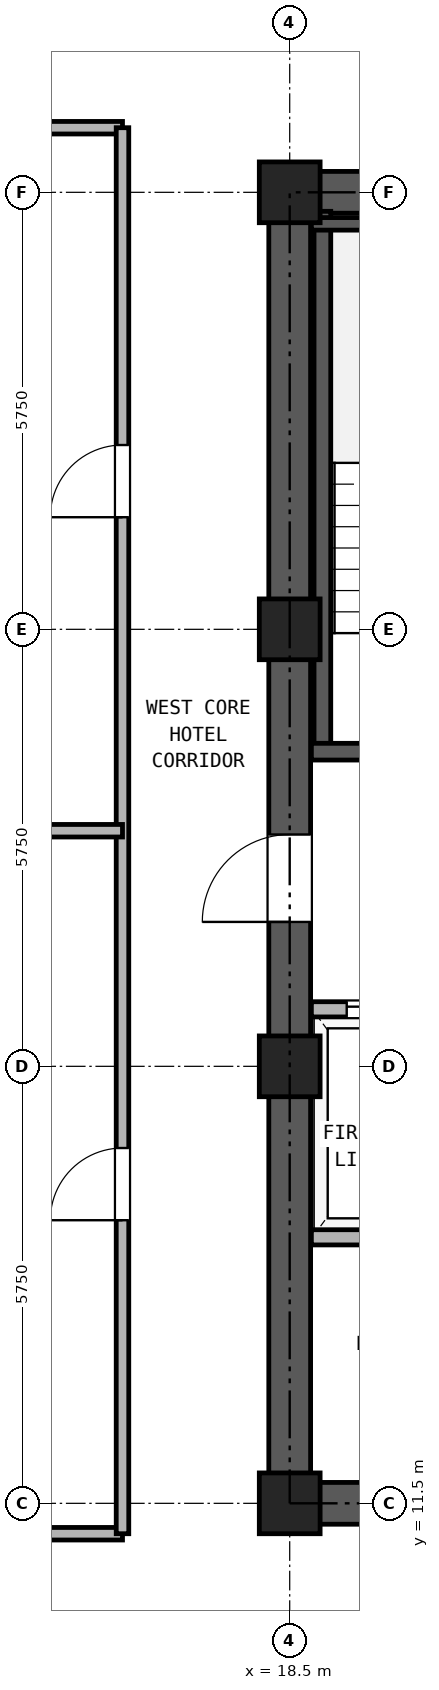
"""IFC4 building model, lengths in metres.
Left out: names, types, materials, properties, quantities, classifications, styles, units other than length and angle.
Written with IfcOpenShell. Run it as: python <this file> out.ifc"""

import sys

from ifc_helpers import new_model, si_unit, direction, frame, frame_2d, origin, origin_2d, place, context, subcontext, project, spatial, rectangle, hollow_rectangle, extrude, source, transform, mapped, element, fill, save


model = new_model("IFC4")
c1 = context("Model", 3, precision=1e-05, world=origin(), true_north=direction((0.0, 1.0)))
c2 = subcontext(c1, "Body", "Model", "MODEL_VIEW")
j1 = project(units=[si_unit("LENGTHUNIT", "METRE"), si_unit("PLANEANGLEUNIT", "RADIAN")], contexts=[c1])
p1 = place(None, origin())
s1 = spatial("IfcSite", under=j1, at=p1, CompositionType="ELEMENT")
p2 = place(p1, origin())
s2 = spatial("IfcBuilding", under=s1, at=p2, CompositionType="ELEMENT")
p3 = place(p2, frame((0.0, 0.0, 148.4)))
s3 = spatial("IfcBuildingStorey", under=s2, at=p3, CompositionType="ELEMENT", Elevation=148.4)
m1 = source(origin(), c2, "Body", "SweptSolid", [
    extrude(hollow_rectangle(XDim=0.8, YDim=0.8, WallThickness=0.045, at=origin_2d()), origin(), (0.0, 0.0, 1.0), 2.84),
])
for number, where, z_axis, x_axis in (
    (1, (18.5, 11.5, 0.0), (0.0, 0.0, 1.0), (1.0, 0.0, 0.0)),
    (2, (18.5, 17.25, 0.0), (0.0, 0.0, 1.0), (1.0, 0.0, 0.0)),
    (3, (18.5, 23.0, 0.0), (0.0, 0.0, 1.0), (1.0, 0.0, 0.0)),
    (4, (18.5, 28.75, 0.0), (0.0, 0.0, 1.0), (1.0, 0.0, 0.0)),
):
    element("IfcColumn", number, at=place(p3, frame(where, z_axis=z_axis, x_axis=x_axis)), inside=s3, PredefinedType="COLUMN", context=c2, shape_type="MappedRepresentation", body=[
        mapped(m1, transform((0.0, 0.0, 0.0), x_axis=(1.0, 0.0, 0.0), y_axis=(0.0, 1.0, 0.0), z_axis=(0.0, 0.0, 1.0), scale=1.0)),
    ])
p4 = place(p3, frame((18.225, 11.5, 0.0), z_axis=(0.0, 0.0, 1.0), x_axis=(1.0, 0.0, 0.0)))
e5 = element("IfcWall", 5, at=p4, inside=s3, PredefinedType="SHEAR", context=c2, shape_type="SweptSolid", body=[
    extrude(rectangle(XDim=10.55, YDim=0.55, at=frame_2d((5.275, 0.0))), origin(), (0.0, 0.0, 1.0), 2.84),
])
p5 = place(p4, frame((2.375, 0.0, 0.0)))
e6 = element("IfcOpeningElement", 6, at=p5, cuts=e5, PredefinedType="OPENING", context=c2, shape_type="SweptSolid", body=[
    extrude(rectangle(XDim=0.95, YDim=2.15, at=frame_2d((0.475, 1.075))), frame((0.0, 0.285, 0.0), z_axis=(0.0, -1.0, 0.0), x_axis=(1.0, 0.0, 0.0)), (0.0, 0.0, 1.0), 0.57),
])
p6 = place(p4, frame((5.875, 0.0, 0.0)))
e7 = element("IfcOpeningElement", 7, at=p6, cuts=e5, PredefinedType="OPENING", context=c2, shape_type="SweptSolid", body=[
    extrude(rectangle(XDim=1.1, YDim=2.25, at=frame_2d((0.55, 1.125))), frame((0.0, 0.285, 0.0), z_axis=(0.0, -1.0, 0.0), x_axis=(1.0, 0.0, 0.0)), (0.0, 0.0, 1.0), 0.57),
])
p7 = place(p4, frame((8.275, 0.0, 0.0)))
e8 = element("IfcOpeningElement", 8, at=p7, cuts=e5, PredefinedType="OPENING", context=c2, shape_type="SweptSolid", body=[
    extrude(rectangle(XDim=1.1, YDim=2.25, at=frame_2d((0.55, 1.125))), frame((0.0, 0.285, 0.0), z_axis=(0.0, -1.0, 0.0), x_axis=(1.0, 0.0, 0.0)), (0.0, 0.0, 1.0), 0.57),
])
p8 = place(p3, frame((18.225, 28.75, 0.0), z_axis=(0.0, 0.0, 1.0), x_axis=(1.0, 0.0, 0.0)))
e9 = element("IfcWall", 9, at=p8, inside=s3, PredefinedType="SHEAR", context=c2, shape_type="SweptSolid", body=[
    extrude(rectangle(XDim=10.55, YDim=0.55, at=frame_2d((5.275, 0.0))), origin(), (0.0, 0.0, 1.0), 2.84),
])
p9 = place(p8, frame((4.155, 0.0, 0.0)))
e10 = element("IfcOpeningElement", 10, at=p9, cuts=e9, PredefinedType="OPENING", context=c2, shape_type="SweptSolid", body=[
    extrude(rectangle(XDim=0.9, YDim=2.05, at=frame_2d((0.45, 1.025))), frame((0.0, 0.285, 0.0), z_axis=(0.0, -1.0, 0.0), x_axis=(1.0, 0.0, 0.0)), (0.0, 0.0, 1.0), 0.57),
])
p10 = place(p8, frame((5.695, 0.0, 0.0)))
e11 = element("IfcOpeningElement", 11, at=p10, cuts=e9, PredefinedType="OPENING", context=c2, shape_type="SweptSolid", body=[
    extrude(rectangle(XDim=0.9, YDim=2.05, at=frame_2d((0.45, 1.025))), frame((0.0, 0.285, 0.0), z_axis=(0.0, -1.0, 0.0), x_axis=(1.0, 0.0, 0.0)), (0.0, 0.0, 1.0), 0.57),
])
p11 = place(p3, frame((18.5, 11.775, 0.0), z_axis=(0.0, 0.0, 1.0), x_axis=(0.0, 1.0, 0.0)))
e12 = element("IfcWall", 12, at=p11, inside=s3, PredefinedType="SHEAR", context=c2, shape_type="SweptSolid", body=[
    extrude(rectangle(XDim=16.7, YDim=0.55, at=frame_2d((8.35, 0.0))), origin(), (0.0, 0.0, 1.0), 2.84),
])
p12 = place(p11, frame((7.375, 0.0, 0.0)))
e13 = element("IfcOpeningElement", 13, at=p12, cuts=e12, PredefinedType="OPENING", context=c2, shape_type="SweptSolid", body=[
    extrude(rectangle(XDim=1.15, YDim=2.2, at=frame_2d((0.575, 1.1))), frame((0.0, 0.285, 0.0), z_axis=(0.0, -1.0, 0.0), x_axis=(1.0, 0.0, 0.0)), (0.0, 0.0, 1.0), 0.57),
])
p13 = place(p3, frame((18.93, 21.39, 0.0), z_axis=(0.0, 0.0, 1.0), x_axis=(0.0, 1.0, 0.0)))
e14 = element("IfcWall", 14, at=p13, inside=s3, PredefinedType="SOLIDWALL", context=c2, shape_type="SweptSolid", body=[
    extrude(rectangle(XDim=7.11, YDim=0.22, at=frame_2d((3.555, 0.0))), origin(), (0.0, 0.0, 1.0), 2.84),
])
p14 = place(p3, frame((18.785, 28.335, 0.0), z_axis=(0.0, 0.0, 1.0), x_axis=(1.0, 0.0, 0.0)))
e15 = element("IfcWall", 15, at=p14, inside=s3, PredefinedType="PARTITIONING", context=c2, shape_type="SweptSolid", body=[
    extrude(rectangle(XDim=3.325, YDim=0.165, at=frame_2d((1.663, 0.0))), origin(), (0.0, 0.0, 1.0), 2.84),
])
p15 = place(p3, frame((18.785, 21.39, 0.0), z_axis=(0.0, 0.0, 1.0), x_axis=(1.0, 0.0, 0.0)))
e16 = element("IfcWall", 16, at=p15, inside=s3, PredefinedType="SOLIDWALL", context=c2, shape_type="SweptSolid", body=[
    extrude(rectangle(XDim=6.345, YDim=0.22, at=frame_2d((3.172, 0.0))), origin(), (0.0, 0.0, 1.0), 2.84),
])
p16 = place(p15, frame((1.065, 0.0, 0.0)))
e17 = element("IfcOpeningElement", 17, at=p16, cuts=e16, PredefinedType="OPENING", context=c2, shape_type="SweptSolid", body=[
    extrude(rectangle(XDim=1.15, YDim=2.2, at=frame_2d((0.575, 1.1))), frame((0.0, 0.12, 0.0), z_axis=(0.0, -1.0, 0.0), x_axis=(1.0, 0.0, 0.0)), (0.0, 0.0, 1.0), 0.24),
])
p17 = place(p15, frame((4.795, 0.0, 0.0)))
e18 = element("IfcOpeningElement", 18, at=p17, cuts=e16, PredefinedType="OPENING", context=c2, shape_type="SweptSolid", body=[
    extrude(rectangle(XDim=1.1, YDim=2.25, at=frame_2d((0.55, 1.125))), frame((0.0, 0.12, 0.0), z_axis=(0.0, -1.0, 0.0), x_axis=(1.0, 0.0, 0.0)), (0.0, 0.0, 1.0), 0.24),
])
p18 = place(p3, frame((18.785, 18.0, 0.0), z_axis=(0.0, 0.0, 1.0), x_axis=(1.0, 0.0, 0.0)))
e19 = element("IfcWall", 19, at=p18, inside=s3, PredefinedType="PARTITIONING", context=c2, shape_type="SweptSolid", body=[
    extrude(rectangle(XDim=9.43, YDim=0.2, at=frame_2d((4.715, 0.0))), origin(), (0.0, 0.0, 1.0), 2.84),
])
p19 = place(p18, frame((0.465, 0.0, 0.0)))
e20 = element("IfcOpeningElement", 20, at=p19, cuts=e19, PredefinedType="OPENING", context=c2, shape_type="SweptSolid", body=[
    extrude(rectangle(XDim=1.3, YDim=2.3, at=frame_2d((0.65, 1.15))), frame((0.0, 0.11, 0.0), z_axis=(0.0, -1.0, 0.0), x_axis=(1.0, 0.0, 0.0)), (0.0, 0.0, 1.0), 0.22),
])
p20 = place(p18, frame((2.565, 0.0, 0.0)))
e21 = element("IfcOpeningElement", 21, at=p20, cuts=e19, PredefinedType="OPENING", context=c2, shape_type="SweptSolid", body=[
    extrude(rectangle(XDim=1.3, YDim=2.3, at=frame_2d((0.65, 1.15))), frame((0.0, 0.11, 0.0), z_axis=(0.0, -1.0, 0.0), x_axis=(1.0, 0.0, 0.0)), (0.0, 0.0, 1.0), 0.22),
])
p21 = place(p18, frame((4.965, 0.0, 0.0)))
e22 = element("IfcOpeningElement", 22, at=p21, cuts=e19, PredefinedType="OPENING", context=c2, shape_type="SweptSolid", body=[
    extrude(rectangle(XDim=0.9, YDim=2.05, at=frame_2d((0.45, 1.025))), frame((0.0, 0.11, 0.0), z_axis=(0.0, -1.0, 0.0), x_axis=(1.0, 0.0, 0.0)), (0.0, 0.0, 1.0), 0.22),
])
p22 = place(p18, frame((7.665, 0.0, 0.0)))
e23 = element("IfcOpeningElement", 23, at=p22, cuts=e19, PredefinedType="OPENING", context=c2, shape_type="SweptSolid", body=[
    extrude(rectangle(XDim=0.9, YDim=2.05, at=frame_2d((0.45, 1.025))), frame((0.0, 0.11, 0.0), z_axis=(0.0, -1.0, 0.0), x_axis=(1.0, 0.0, 0.0)), (0.0, 0.0, 1.0), 0.22),
])
p23 = place(p3, frame((18.785, 15.0, 0.0), z_axis=(0.0, 0.0, 1.0), x_axis=(1.0, 0.0, 0.0)))
e24 = element("IfcWall", 24, at=p23, inside=s3, PredefinedType="PARTITIONING", context=c2, shape_type="SweptSolid", body=[
    extrude(rectangle(XDim=9.43, YDim=0.2, at=frame_2d((4.715, 0.0))), origin(), (0.0, 0.0, 1.0), 2.84),
])
for number, where, z_axis, x_axis in (
    (25, (7.8, 11.1, 0.0), (0.0, 0.0, 1.0), (1.0, 0.0, 0.0)),
    (26, (7.8, 29.6, 0.0), (0.0, 0.0, 1.0), (1.0, 0.0, 0.0)),
):
    element("IfcWall", number, at=place(p3, frame(where, z_axis=z_axis, x_axis=x_axis)), inside=s3, PredefinedType="PARTITIONING", context=c2, shape_type="SweptSolid", body=[
        extrude(rectangle(XDim=8.5, YDim=0.165, at=frame_2d((4.25, 0.0))), origin(), (0.0, 0.0, 1.0), 2.84),
    ])
p24 = place(p3, frame((16.3, 11.1, 0.0), z_axis=(0.0, 0.0, 1.0), x_axis=(0.0, 1.0, 0.0)))
e27 = element("IfcWall", 27, at=p24, inside=s3, PredefinedType="PARTITIONING", context=c2, shape_type="SweptSolid", body=[
    extrude(rectangle(XDim=18.5, YDim=0.165, at=frame_2d((9.25, 0.0))), origin(), (0.0, 0.0, 1.0), 2.84),
])
p25 = place(p24, frame((4.125, 0.0, 0.0)))
e28 = element("IfcOpeningElement", 28, at=p25, cuts=e27, PredefinedType="OPENING", context=c2, shape_type="SweptSolid", body=[
    extrude(rectangle(XDim=0.95, YDim=2.15, at=frame_2d((0.475, 1.075))), frame((0.0, 0.093, 0.0), z_axis=(0.0, -1.0, 0.0), x_axis=(1.0, 0.0, 0.0)), (0.0, 0.0, 1.0), 0.185),
])
p26 = place(p24, frame((13.375, 0.0, 0.0)))
e29 = element("IfcOpeningElement", 29, at=p26, cuts=e27, PredefinedType="OPENING", context=c2, shape_type="SweptSolid", body=[
    extrude(rectangle(XDim=0.95, YDim=2.15, at=frame_2d((0.475, 1.075))), frame((0.0, 0.093, 0.0), z_axis=(0.0, -1.0, 0.0), x_axis=(1.0, 0.0, 0.0)), (0.0, 0.0, 1.0), 0.185),
])
p27 = place(p3, frame((0.16, 20.35, 0.0), z_axis=(0.0, 0.0, 1.0), x_axis=(1.0, 0.0, 0.0)))
e30 = element("IfcWall", 30, at=p27, inside=s3, PredefinedType="PARTITIONING", context=c2, shape_type="SweptSolid", body=[
    extrude(rectangle(XDim=16.14, YDim=0.165, at=frame_2d((8.07, 0.0))), origin(), (0.0, 0.0, 1.0), 2.473),
])
p28 = place(p19, origin())
e31 = element("IfcDoor", 31, at=p28, inside=s3, OperationType="DOUBLE_DOOR_SLIDING", PredefinedType="DOOR", context=c2, shape_type="SweptSolid", body=[
    extrude(rectangle(XDim=1.3, YDim=2.3, at=frame_2d((0.65, 1.15))), frame((0.0, 0.025, 0.0), z_axis=(0.0, -1.0, 0.0), x_axis=(1.0, 0.0, 0.0)), (0.0, 0.0, 1.0), 0.05),
])
fill(e20, e31)
p29 = place(p12, frame((1.15, 0.0, 0.0), z_axis=(0.0, 0.0, 1.0), x_axis=(-1.0, 0.0, 0.0)))
e32 = element("IfcDoor", 32, at=p29, inside=s3, OperationType="SINGLE_SWING_LEFT", PredefinedType="DOOR", context=c2, shape_type="SweptSolid", body=[
    extrude(rectangle(XDim=1.15, YDim=2.2, at=frame_2d((0.575, 1.1))), frame((0.0, 0.025, 0.0), z_axis=(0.0, -1.0, 0.0), x_axis=(1.0, 0.0, 0.0)), (0.0, 0.0, 1.0), 0.05),
])
fill(e13, e32)
p30 = place(p25, frame((0.95, 0.0, 0.0), z_axis=(0.0, 0.0, 1.0), x_axis=(-1.0, 0.0, 0.0)))
e33 = element("IfcDoor", 33, at=p30, inside=s3, OperationType="SINGLE_SWING_LEFT", PredefinedType="DOOR", context=c2, shape_type="SweptSolid", body=[
    extrude(rectangle(XDim=0.95, YDim=2.15, at=frame_2d((0.475, 1.075))), frame((0.0, 0.025, 0.0), z_axis=(0.0, -1.0, 0.0), x_axis=(1.0, 0.0, 0.0)), (0.0, 0.0, 1.0), 0.05),
])
fill(e28, e33)
p31 = place(p26, frame((0.95, 0.0, 0.0), z_axis=(0.0, 0.0, 1.0), x_axis=(-1.0, 0.0, 0.0)))
e34 = element("IfcDoor", 34, at=p31, inside=s3, OperationType="SINGLE_SWING_LEFT", PredefinedType="DOOR", context=c2, shape_type="SweptSolid", body=[
    extrude(rectangle(XDim=0.95, YDim=2.15, at=frame_2d((0.475, 1.075))), frame((0.0, 0.025, 0.0), z_axis=(0.0, -1.0, 0.0), x_axis=(1.0, 0.0, 0.0)), (0.0, 0.0, 1.0), 0.05),
])
fill(e29, e34)
save(model, sys.argv[1])
